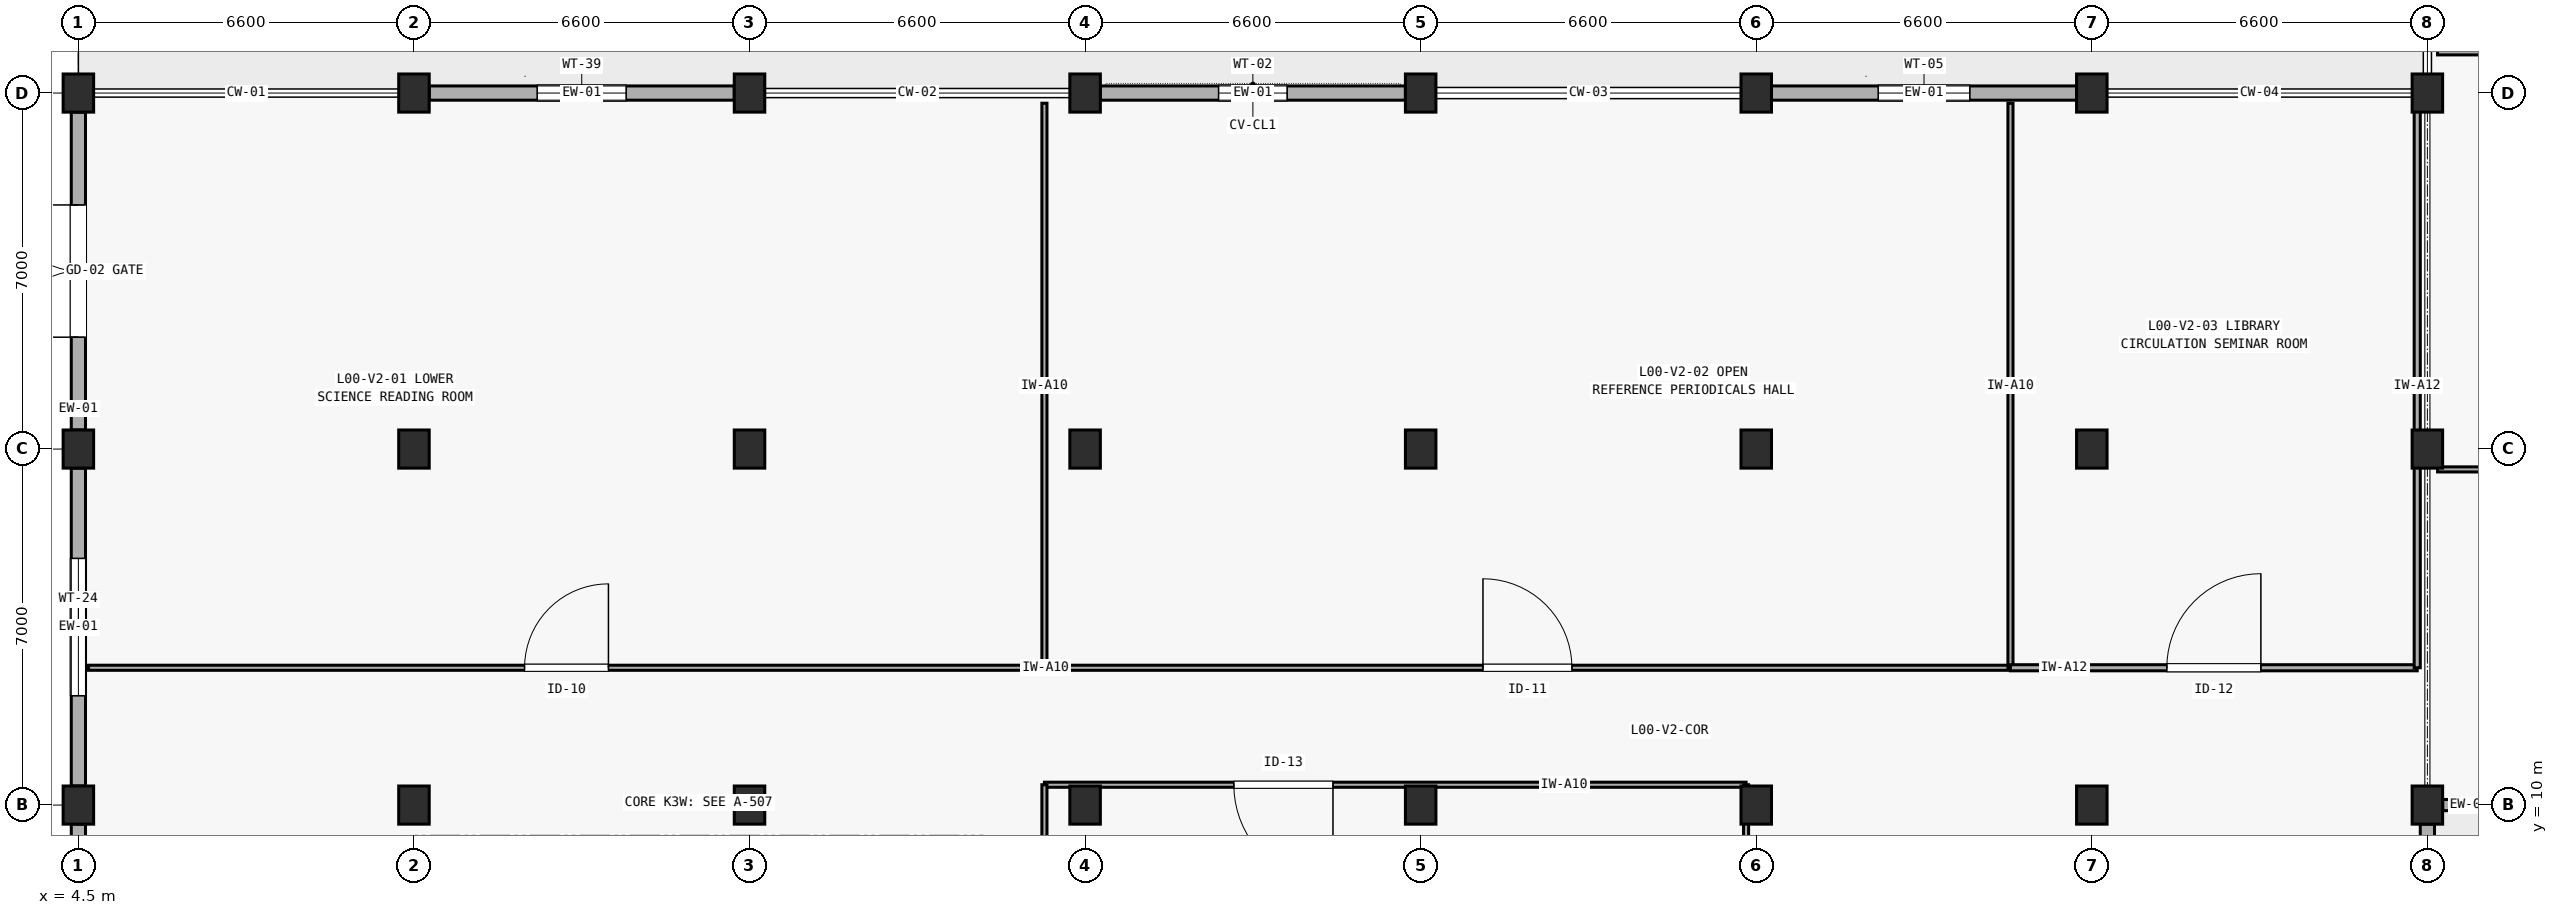
"""IFC4 building model, lengths in metres.
Left out: names, types, materials, properties, quantities, classifications, styles, units other than length and angle.
Written with IfcOpenShell. Run it as: python <this file> out.ifc"""

import sys

from ifc_helpers import new_model, si_unit, direction, frame, frame_2d, origin, origin_2d, place, context, subcontext, project, spatial, rectangle, extrude, element, fill, save


model = new_model("IFC4")
c1 = context("Model", 3, precision=1e-05, world=origin(), true_north=direction((0.0, 1.0)))
c2 = subcontext(c1, "Body", "Model", "MODEL_VIEW")
j1 = project(units=[si_unit("LENGTHUNIT", "METRE"), si_unit("PLANEANGLEUNIT", "RADIAN")], contexts=[c1])
p1 = place(None, origin())
s1 = spatial("IfcSite", under=j1, at=p1, CompositionType="ELEMENT")
p2 = place(p1, origin())
s2 = spatial("IfcBuilding", under=s1, at=p2, CompositionType="ELEMENT")
p3 = place(p2, origin())
s3 = spatial("IfcBuildingStorey", under=s2, at=p3, CompositionType="ELEMENT", Elevation=0.0)
for number, where, z_axis, x_axis in (
    (1, (4.5, 10.0, 0.0), (0.0, 0.0, 1.0), (1.0, 0.0, 0.0)),
    (2, (4.5, 17.0, 0.0), (0.0, 0.0, 1.0), (1.0, 0.0, 0.0)),
    (3, (4.5, 24.0, 0.0), (0.0, 0.0, 1.0), (1.0, 0.0, 0.0)),
    (4, (11.1, 10.0, 0.0), (0.0, 0.0, 1.0), (1.0, 0.0, 0.0)),
    (5, (11.1, 17.0, 0.0), (0.0, 0.0, 1.0), (1.0, 0.0, 0.0)),
    (6, (11.1, 24.0, 0.0), (0.0, 0.0, 1.0), (1.0, 0.0, 0.0)),
    (7, (17.7, 10.0, 0.0), (0.0, 0.0, 1.0), (1.0, 0.0, 0.0)),
    (8, (17.7, 17.0, 0.0), (0.0, 0.0, 1.0), (1.0, 0.0, 0.0)),
    (9, (17.7, 24.0, 0.0), (0.0, 0.0, 1.0), (1.0, 0.0, 0.0)),
    (10, (24.3, 10.0, 0.0), (0.0, 0.0, 1.0), (1.0, 0.0, 0.0)),
    (11, (24.3, 17.0, 0.0), (0.0, 0.0, 1.0), (1.0, 0.0, 0.0)),
    (12, (24.3, 24.0, 0.0), (0.0, 0.0, 1.0), (1.0, 0.0, 0.0)),
    (13, (30.9, 10.0, 0.0), (0.0, 0.0, 1.0), (1.0, 0.0, 0.0)),
    (14, (30.9, 17.0, 0.0), (0.0, 0.0, 1.0), (1.0, 0.0, 0.0)),
    (15, (30.9, 24.0, 0.0), (0.0, 0.0, 1.0), (1.0, 0.0, 0.0)),
    (16, (37.5, 10.0, 0.0), (0.0, 0.0, 1.0), (1.0, 0.0, 0.0)),
    (17, (37.5, 17.0, 0.0), (0.0, 0.0, 1.0), (1.0, 0.0, 0.0)),
    (18, (37.5, 24.0, 0.0), (0.0, 0.0, 1.0), (1.0, 0.0, 0.0)),
    (19, (44.1, 10.0, 0.0), (0.0, 0.0, 1.0), (1.0, 0.0, 0.0)),
    (20, (44.1, 17.0, 0.0), (0.0, 0.0, 1.0), (1.0, 0.0, 0.0)),
    (21, (44.1, 24.0, 0.0), (0.0, 0.0, 1.0), (1.0, 0.0, 0.0)),
    (22, (50.7, 10.0, 0.0), (0.0, 0.0, 1.0), (1.0, 0.0, 0.0)),
    (23, (50.7, 17.0, 0.0), (0.0, 0.0, 1.0), (1.0, 0.0, 0.0)),
    (24, (50.7, 24.0, 0.0), (0.0, 0.0, 1.0), (1.0, 0.0, 0.0)),
):
    element("IfcColumn", number, at=place(p3, frame(where, z_axis=z_axis, x_axis=x_axis)), inside=s3, PredefinedType="COLUMN", context=c2, shape_type="SweptSolid", body=[
        extrude(rectangle(XDim=0.6, YDim=0.75, at=origin_2d()), origin(), (0.0, 0.0, 1.0), 4.2),
    ])
p4 = place(p3, frame((51.0, 10.0, 0.0), z_axis=(0.0, 0.0, 1.0), x_axis=(1.0, 0.0, 0.0)))
e25 = element("IfcWall", 25, at=p4, inside=s3, PredefinedType="SOLIDWALL", context=c2, shape_type="SweptSolid", body=[
    extrude(rectangle(XDim=5.925, YDim=0.22, at=frame_2d((2.962, 0.0))), origin(), (0.0, 0.0, 1.0), 3.385),
])
p5 = place(p4, frame((2.012, 0.0, 0.0)))
e26 = element("IfcOpeningElement", 26, at=p5, cuts=e25, PredefinedType="OPENING", context=c2, shape_type="SweptSolid", body=[
    extrude(rectangle(XDim=1.9, YDim=2.2, at=frame_2d((0.95, 1.1))), frame((0.0, 0.12, 0.0), z_axis=(0.0, -1.0, 0.0), x_axis=(1.0, 0.0, 0.0)), (0.0, 0.0, 1.0), 0.24),
])
p6 = place(p3, frame((11.4, 24.0, 0.0), z_axis=(0.0, 0.0, 1.0), x_axis=(1.0, 0.0, 0.0)))
e27 = element("IfcWall", 27, at=p6, inside=s3, PredefinedType="SOLIDWALL", context=c2, shape_type="SweptSolid", body=[
    extrude(rectangle(XDim=6.0, YDim=0.28, at=frame_2d((3.0, 0.0))), origin(), (0.0, 0.0, 1.0), 3.135),
])
p7 = place(p6, frame((2.125, 0.0, 0.85)))
e28 = element("IfcOpeningElement", 28, at=p7, cuts=e27, PredefinedType="OPENING", context=c2, shape_type="SweptSolid", body=[
    extrude(rectangle(XDim=1.75, YDim=1.55, at=frame_2d((0.875, 0.775))), frame((0.0, 0.15, 0.0), z_axis=(0.0, -1.0, 0.0), x_axis=(1.0, 0.0, 0.0)), (0.0, 0.0, 1.0), 0.3),
])
p8 = place(p3, frame((24.6, 24.0, 0.0), z_axis=(0.0, 0.0, 1.0), x_axis=(1.0, 0.0, 0.0)))
e29 = element("IfcWall", 29, at=p8, inside=s3, PredefinedType="SOLIDWALL", context=c2, shape_type="SweptSolid", body=[
    extrude(rectangle(XDim=6.0, YDim=0.28, at=frame_2d((3.0, 0.0))), origin(), (0.0, 0.0, 1.0), 3.235),
])
p9 = place(p8, frame((2.325, 0.0, 0.85)))
e30 = element("IfcOpeningElement", 30, at=p9, cuts=e29, PredefinedType="OPENING", context=c2, shape_type="SweptSolid", body=[
    extrude(rectangle(XDim=1.35, YDim=1.35, at=frame_2d((0.675, 0.675))), frame((0.0, 0.15, 0.0), z_axis=(0.0, -1.0, 0.0), x_axis=(1.0, 0.0, 0.0)), (0.0, 0.0, 1.0), 0.3),
])
p10 = place(p3, frame((37.8, 24.0, 0.0), z_axis=(0.0, 0.0, 1.0), x_axis=(1.0, 0.0, 0.0)))
e31 = element("IfcWall", 31, at=p10, inside=s3, PredefinedType="SOLIDWALL", context=c2, shape_type="SweptSolid", body=[
    extrude(rectangle(XDim=6.0, YDim=0.28, at=frame_2d((3.0, 0.0))), origin(), (0.0, 0.0, 1.0), 3.365),
])
p11 = place(p10, frame((2.1, 0.0, 0.85)))
e32 = element("IfcOpeningElement", 32, at=p11, cuts=e31, PredefinedType="OPENING", context=c2, shape_type="SweptSolid", body=[
    extrude(rectangle(XDim=1.8, YDim=1.35, at=frame_2d((0.9, 0.675))), frame((0.0, 0.15, 0.0), z_axis=(0.0, -1.0, 0.0), x_axis=(1.0, 0.0, 0.0)), (0.0, 0.0, 1.0), 0.3),
])
p12 = place(p3, frame((4.5, 3.375, 0.0), z_axis=(0.0, 0.0, 1.0), x_axis=(0.0, 1.0, 0.0)))
e33 = element("IfcWall", 33, at=p12, inside=s3, PredefinedType="SOLIDWALL", context=c2, shape_type="SweptSolid", body=[
    extrude(rectangle(XDim=6.25, YDim=0.28, at=frame_2d((3.125, 0.0))), origin(), (0.0, 0.0, 1.0), 3.465),
])
p13 = place(p12, frame((2.075, 0.0, 0.85)))
e34 = element("IfcOpeningElement", 34, at=p13, cuts=e33, PredefinedType="OPENING", context=c2, shape_type="SweptSolid", body=[
    extrude(rectangle(XDim=2.1, YDim=1.6, at=frame_2d((1.05, 0.8))), frame((0.0, 0.15, 0.0), z_axis=(0.0, -1.0, 0.0), x_axis=(1.0, 0.0, 0.0)), (0.0, 0.0, 1.0), 0.3),
])
p14 = place(p3, frame((4.5, 10.375, 0.0), z_axis=(0.0, 0.0, 1.0), x_axis=(0.0, 1.0, 0.0)))
e35 = element("IfcWall", 35, at=p14, inside=s3, PredefinedType="SOLIDWALL", context=c2, shape_type="SweptSolid", body=[
    extrude(rectangle(XDim=6.25, YDim=0.28, at=frame_2d((3.125, 0.0))), origin(), (0.0, 0.0, 1.0), 3.465),
])
p15 = place(p14, frame((1.775, 0.0, 0.85)))
e36 = element("IfcOpeningElement", 36, at=p15, cuts=e35, PredefinedType="OPENING", context=c2, shape_type="SweptSolid", body=[
    extrude(rectangle(XDim=2.7, YDim=1.6, at=frame_2d((1.35, 0.8))), frame((0.0, 0.15, 0.0), z_axis=(0.0, -1.0, 0.0), x_axis=(1.0, 0.0, 0.0)), (0.0, 0.0, 1.0), 0.3),
])
p16 = place(p3, frame((4.5, 17.375, 0.0), z_axis=(0.0, 0.0, 1.0), x_axis=(0.0, 1.0, 0.0)))
e37 = element("IfcWall", 37, at=p16, inside=s3, PredefinedType="SOLIDWALL", context=c2, shape_type="SweptSolid", body=[
    extrude(rectangle(XDim=6.25, YDim=0.28, at=frame_2d((3.125, 0.0))), origin(), (0.0, 0.0, 1.0), 3.465),
])
p17 = place(p16, frame((1.825, 0.0, 0.0)))
e38 = element("IfcOpeningElement", 38, at=p17, cuts=e37, PredefinedType="OPENING", context=c2, shape_type="SweptSolid", body=[
    extrude(rectangle(XDim=2.6, YDim=2.35, at=frame_2d((1.3, 1.175))), frame((0.0, 0.15, 0.0), z_axis=(0.0, -1.0, 0.0), x_axis=(1.0, 0.0, 0.0)), (0.0, 0.0, 1.0), 0.3),
])
p18 = place(p3, frame((50.7, 3.375, 0.0), z_axis=(0.0, 0.0, 1.0), x_axis=(0.0, 1.0, 0.0)))
e39 = element("IfcWall", 39, at=p18, inside=s3, PredefinedType="SOLIDWALL", context=c2, shape_type="SweptSolid", body=[
    extrude(rectangle(XDim=6.25, YDim=0.28, at=frame_2d((3.125, 0.0))), origin(), (0.0, 0.0, 1.0), 3.505),
])
p19 = place(p18, frame((2.575, 0.0, 0.85)))
e40 = element("IfcOpeningElement", 40, at=p19, cuts=e39, PredefinedType="OPENING", context=c2, shape_type="SweptSolid", body=[
    extrude(rectangle(XDim=1.1, YDim=1.45, at=frame_2d((0.55, 0.725))), frame((0.0, 0.15, 0.0), z_axis=(0.0, -1.0, 0.0), x_axis=(1.0, 0.0, 0.0)), (0.0, 0.0, 1.0), 0.3),
])
p20 = place(p3, frame((4.7, 12.7, 0.0), z_axis=(0.0, 0.0, 1.0), x_axis=(1.0, 0.0, 0.0)))
e41 = element("IfcWall", 41, at=p20, inside=s3, PredefinedType="PARTITIONING", context=c2, shape_type="SweptSolid", body=[
    extrude(rectangle(XDim=18.8, YDim=0.1, at=frame_2d((9.4, 0.0))), origin(), (0.0, 0.0, 1.0), 3.9),
])
p21 = place(p20, frame((8.575, 0.0, 0.0)))
e42 = element("IfcOpeningElement", 42, at=p21, cuts=e41, PredefinedType="OPENING", context=c2, shape_type="SweptSolid", body=[
    extrude(rectangle(XDim=1.65, YDim=2.25, at=frame_2d((0.825, 1.125))), frame((0.0, 0.06, 0.0), z_axis=(0.0, -1.0, 0.0), x_axis=(1.0, 0.0, 0.0)), (0.0, 0.0, 1.0), 0.12),
])
p22 = place(p3, frame((23.5, 12.7, 0.0), z_axis=(0.0, 0.0, 1.0), x_axis=(0.0, 1.0, 0.0)))
e43 = element("IfcWall", 43, at=p22, inside=s3, PredefinedType="PARTITIONING", context=c2, shape_type="SweptSolid", body=[
    extrude(rectangle(XDim=11.1, YDim=0.1, at=frame_2d((5.55, 0.0))), origin(), (0.0, 0.0, 1.0), 3.9),
])
p23 = place(p3, frame((23.5, 12.7, 0.0), z_axis=(0.0, 0.0, 1.0), x_axis=(1.0, 0.0, 0.0)))
e44 = element("IfcWall", 44, at=p23, inside=s3, PredefinedType="PARTITIONING", context=c2, shape_type="SweptSolid", body=[
    extrude(rectangle(XDim=19.0, YDim=0.1, at=frame_2d((9.5, 0.0))), origin(), (0.0, 0.0, 1.0), 3.9),
])
p24 = place(p23, frame((8.625, 0.0, 0.0)))
e45 = element("IfcOpeningElement", 45, at=p24, cuts=e44, PredefinedType="OPENING", context=c2, shape_type="SweptSolid", body=[
    extrude(rectangle(XDim=1.75, YDim=2.25, at=frame_2d((0.875, 1.125))), frame((0.0, 0.06, 0.0), z_axis=(0.0, -1.0, 0.0), x_axis=(1.0, 0.0, 0.0)), (0.0, 0.0, 1.0), 0.12),
])
p25 = place(p3, frame((42.5, 12.7, 0.0), z_axis=(0.0, 0.0, 1.0), x_axis=(0.0, 1.0, 0.0)))
e46 = element("IfcWall", 46, at=p25, inside=s3, PredefinedType="PARTITIONING", context=c2, shape_type="SweptSolid", body=[
    extrude(rectangle(XDim=11.1, YDim=0.1, at=frame_2d((5.55, 0.0))), origin(), (0.0, 0.0, 1.0), 3.574),
])
p26 = place(p3, frame((42.5, 12.7, 0.0), z_axis=(0.0, 0.0, 1.0), x_axis=(1.0, 0.0, 0.0)))
e47 = element("IfcWall", 47, at=p26, inside=s3, PredefinedType="PARTITIONING", context=c2, shape_type="SweptSolid", body=[
    extrude(rectangle(XDim=8.0, YDim=0.12, at=frame_2d((4.0, 0.0))), origin(), (0.0, 0.0, 1.0), 3.9),
])
p27 = place(p26, frame((3.075, 0.0, 0.0)))
e48 = element("IfcOpeningElement", 48, at=p27, cuts=e47, PredefinedType="OPENING", context=c2, shape_type="SweptSolid", body=[
    extrude(rectangle(XDim=1.85, YDim=2.3, at=frame_2d((0.925, 1.15))), frame((0.0, 0.07, 0.0), z_axis=(0.0, -1.0, 0.0), x_axis=(1.0, 0.0, 0.0)), (0.0, 0.0, 1.0), 0.14),
])
p28 = place(p3, frame((50.5, 12.7, 0.0), z_axis=(0.0, 0.0, 1.0), x_axis=(0.0, 1.0, 0.0)))
e49 = element("IfcWall", 49, at=p28, inside=s3, PredefinedType="PARTITIONING", context=c2, shape_type="SweptSolid", body=[
    extrude(rectangle(XDim=11.1, YDim=0.12, at=frame_2d((5.55, 0.0))), origin(), (0.0, 0.0, 1.0), 3.405),
])
p29 = place(p3, frame((23.5, 10.4, 0.0), z_axis=(0.0, 0.0, 1.0), x_axis=(1.0, 0.0, 0.0)))
e50 = element("IfcWall", 50, at=p29, inside=s3, PredefinedType="PARTITIONING", context=c2, shape_type="SweptSolid", body=[
    extrude(rectangle(XDim=13.8, YDim=0.1, at=frame_2d((6.9, 0.0))), origin(), (0.0, 0.0, 1.0), 3.9),
])
p30 = place(p29, frame((3.725, 0.0, 0.0)))
e51 = element("IfcOpeningElement", 51, at=p30, cuts=e50, PredefinedType="OPENING", context=c2, shape_type="SweptSolid", body=[
    extrude(rectangle(XDim=1.95, YDim=2.3, at=frame_2d((0.975, 1.15))), frame((0.0, 0.06, 0.0), z_axis=(0.0, -1.0, 0.0), x_axis=(1.0, 0.0, 0.0)), (0.0, 0.0, 1.0), 0.12),
])
for number, where, z_axis, x_axis in (
    (52, (23.5, 3.2, 0.0), (0.0, 0.0, 1.0), (0.0, 1.0, 0.0)),
    (53, (37.3, 3.2, 0.0), (0.0, 0.0, 1.0), (0.0, 1.0, 0.0)),
):
    element("IfcWall", number, at=place(p3, frame(where, z_axis=z_axis, x_axis=x_axis)), inside=s3, PredefinedType="PARTITIONING", context=c2, shape_type="SweptSolid", body=[
        extrude(rectangle(XDim=7.2, YDim=0.1, at=frame_2d((3.6, 0.0))), origin(), (0.0, 0.0, 1.0), 3.9),
    ])
p31 = place(p3, frame((50.9, 16.6, 0.0), z_axis=(0.0, 0.0, 1.0), x_axis=(1.0, 0.0, 0.0)))
e54 = element("IfcWall", 54, at=p31, inside=s3, PredefinedType="PARTITIONING", context=c2, shape_type="SweptSolid", body=[
    extrude(rectangle(XDim=16.6, YDim=0.1, at=frame_2d((8.3, 0.0))), origin(), (0.0, 0.0, 1.0), 3.9),
])
p32 = place(p3, frame((50.9, 24.8, 0.0), z_axis=(0.0, 0.0, 1.0), x_axis=(1.0, 0.0, 0.0)))
e55 = element("IfcWall", 55, at=p32, inside=s3, PredefinedType="PARTITIONING", context=c2, shape_type="SweptSolid", body=[
    extrude(rectangle(XDim=16.6, YDim=0.1, at=frame_2d((8.3, 0.0))), origin(), (0.0, 0.0, 1.0), 3.9),
])
p33 = place(p32, frame((7.875, 0.0, 0.0)))
e56 = element("IfcOpeningElement", 56, at=p33, cuts=e55, PredefinedType="OPENING", context=c2, shape_type="SweptSolid", body=[
    extrude(rectangle(XDim=1.25, YDim=2.15, at=frame_2d((0.625, 1.075))), frame((0.0, 0.06, 0.0), z_axis=(0.0, -1.0, 0.0), x_axis=(1.0, 0.0, 0.0)), (0.0, 0.0, 1.0), 0.12),
])
p34 = place(p7, origin())
e57 = element("IfcWindow", 57, at=p34, inside=s3, PartitioningType="SINGLE_PANEL", PredefinedType="WINDOW", context=c2, shape_type="SweptSolid", body=[
    extrude(rectangle(XDim=1.75, YDim=1.55, at=frame_2d((0.875, 0.775))), frame((0.0, 0.03, 0.0), z_axis=(0.0, -1.0, 0.0), x_axis=(1.0, 0.0, 0.0)), (0.0, 0.0, 1.0), 0.06),
])
fill(e28, e57)
p35 = place(p9, origin())
e58 = element("IfcWindow", 58, at=p35, inside=s3, PartitioningType="SINGLE_PANEL", PredefinedType="WINDOW", context=c2, shape_type="SweptSolid", body=[
    extrude(rectangle(XDim=1.35, YDim=1.35, at=frame_2d((0.675, 0.675))), frame((0.0, 0.03, 0.0), z_axis=(0.0, -1.0, 0.0), x_axis=(1.0, 0.0, 0.0)), (0.0, 0.0, 1.0), 0.06),
])
fill(e30, e58)
p36 = place(p11, origin())
e59 = element("IfcWindow", 59, at=p36, inside=s3, PartitioningType="SINGLE_PANEL", PredefinedType="WINDOW", context=c2, shape_type="SweptSolid", body=[
    extrude(rectangle(XDim=1.8, YDim=1.35, at=frame_2d((0.9, 0.675))), frame((0.0, 0.03, 0.0), z_axis=(0.0, -1.0, 0.0), x_axis=(1.0, 0.0, 0.0)), (0.0, 0.0, 1.0), 0.06),
])
fill(e32, e59)
p37 = place(p15, origin())
e60 = element("IfcWindow", 60, at=p37, inside=s3, PartitioningType="SINGLE_PANEL", PredefinedType="WINDOW", context=c2, shape_type="SweptSolid", body=[
    extrude(rectangle(XDim=2.7, YDim=1.6, at=frame_2d((1.35, 0.8))), frame((0.0, 0.03, 0.0), z_axis=(0.0, -1.0, 0.0), x_axis=(1.0, 0.0, 0.0)), (0.0, 0.0, 1.0), 0.06),
])
fill(e36, e60)
p38 = place(p17, origin())
e61 = element("IfcDoor", 61, at=p38, inside=s3, OperationType="DOUBLE_DOOR_SINGLE_SWING", PredefinedType="GATE", context=c2, shape_type="SweptSolid", body=[
    extrude(rectangle(XDim=2.6, YDim=2.35, at=frame_2d((1.3, 1.175))), frame((0.0, 0.025, 0.0), z_axis=(0.0, -1.0, 0.0), x_axis=(1.0, 0.0, 0.0)), (0.0, 0.0, 1.0), 0.05),
])
fill(e38, e61)
p39 = place(p21, origin())
e62 = element("IfcDoor", 62, at=p39, inside=s3, OperationType="SINGLE_SWING_RIGHT", PredefinedType="DOOR", context=c2, shape_type="SweptSolid", body=[
    extrude(rectangle(XDim=1.65, YDim=2.25, at=frame_2d((0.825, 1.125))), frame((0.0, 0.025, 0.0), z_axis=(0.0, -1.0, 0.0), x_axis=(1.0, 0.0, 0.0)), (0.0, 0.0, 1.0), 0.05),
])
fill(e42, e62)
p40 = place(p24, origin())
e63 = element("IfcDoor", 63, at=p40, inside=s3, OperationType="SINGLE_SWING_LEFT", PredefinedType="DOOR", context=c2, shape_type="SweptSolid", body=[
    extrude(rectangle(XDim=1.75, YDim=2.25, at=frame_2d((0.875, 1.125))), frame((0.0, 0.025, 0.0), z_axis=(0.0, -1.0, 0.0), x_axis=(1.0, 0.0, 0.0)), (0.0, 0.0, 1.0), 0.05),
])
fill(e45, e63)
p41 = place(p27, origin())
e64 = element("IfcDoor", 64, at=p41, inside=s3, OperationType="SINGLE_SWING_RIGHT", PredefinedType="DOOR", context=c2, shape_type="SweptSolid", body=[
    extrude(rectangle(XDim=1.85, YDim=2.3, at=frame_2d((0.925, 1.15))), frame((0.0, 0.025, 0.0), z_axis=(0.0, -1.0, 0.0), x_axis=(1.0, 0.0, 0.0)), (0.0, 0.0, 1.0), 0.05),
])
fill(e48, e64)
p42 = place(p30, frame((1.95, 0.0, 0.0), z_axis=(0.0, 0.0, 1.0), x_axis=(-1.0, 0.0, 0.0)))
e65 = element("IfcDoor", 65, at=p42, inside=s3, OperationType="SINGLE_SWING_LEFT", PredefinedType="DOOR", context=c2, shape_type="SweptSolid", body=[
    extrude(rectangle(XDim=1.95, YDim=2.3, at=frame_2d((0.975, 1.15))), frame((0.0, 0.025, 0.0), z_axis=(0.0, -1.0, 0.0), x_axis=(1.0, 0.0, 0.0)), (0.0, 0.0, 1.0), 0.05),
])
fill(e51, e65)
save(model, sys.argv[1])
